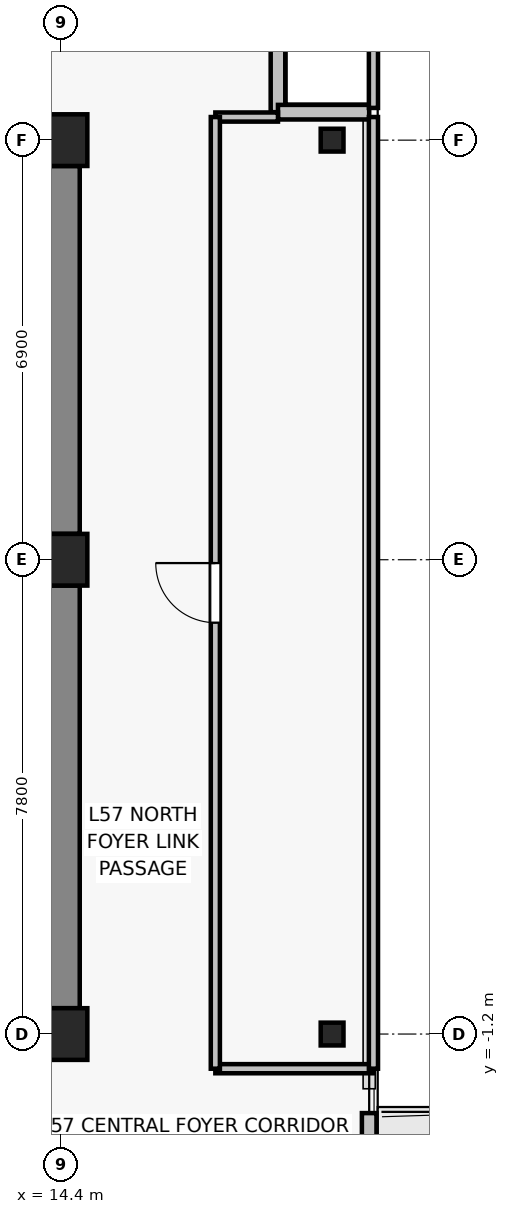
"""IFC4 building model, lengths in metres.
Left out: names, types, materials, properties, quantities, classifications, styles, units other than length and angle.
Written with IfcOpenShell. Run it as: python <this file> out.ifc"""

import sys

from ifc_helpers import new_model, si_unit, direction, frame, frame_2d, origin, origin_2d, place, context, subcontext, project, spatial, rectangle, i_section, extrude, source, transform, mapped, element, fill, save


model = new_model("IFC4")
c1 = context("Model", 3, precision=1e-05, world=origin(), true_north=direction((0.0, 1.0)))
c2 = subcontext(c1, "Body", "Model", "MODEL_VIEW")
j1 = project(units=[si_unit("LENGTHUNIT", "METRE"), si_unit("PLANEANGLEUNIT", "RADIAN")], contexts=[c1])
p1 = place(None, origin())
s1 = spatial("IfcSite", under=j1, at=p1, CompositionType="ELEMENT")
p2 = place(p1, origin())
s2 = spatial("IfcBuilding", under=s1, at=p2, CompositionType="ELEMENT")
p3 = place(p2, frame((0.0, 0.0, 205.6)))
s3 = spatial("IfcBuildingStorey", under=s2, at=p3, CompositionType="ELEMENT", Elevation=205.6)
for number, where, z_axis, x_axis in (
    (1, (14.4, -1.2, 0.0), (0.0, 0.0, 1.0), (1.0, 0.0, 0.0)),
    (2, (14.4, 6.6, 0.0), (0.0, 0.0, 1.0), (1.0, 0.0, 0.0)),
    (3, (14.4, 13.5, 0.0), (0.0, 0.0, 1.0), (1.0, 0.0, 0.0)),
):
    element("IfcColumn", number, at=place(p3, frame(where, z_axis=z_axis, x_axis=x_axis)), inside=s3, PredefinedType="COLUMN", context=c2, shape_type="SweptSolid", body=[
        extrude(rectangle(XDim=0.85, YDim=0.85, at=origin_2d()), origin(), (0.0, 0.0, 1.0), 3.3),
    ])
for number, where, z_axis, x_axis in (
    (4, (18.85, -1.2, 0.0), (0.0, 0.0, 1.0), (1.0, 0.0, 0.0)),
    (5, (18.85, 13.5, 0.0), (0.0, 0.0, 1.0), (1.0, 0.0, 0.0)),
):
    element("IfcColumn", number, at=place(p3, frame(where, z_axis=z_axis, x_axis=x_axis)), inside=s3, PredefinedType="COLUMN", context=c2, shape_type="SweptSolid", body=[
        extrude(i_section(OverallWidth=0.375, OverallDepth=0.375, WebThickness=0.017, FlangeThickness=0.027, FilletRadius=0.015, at=origin_2d()), origin(), (0.0, 0.0, 1.0), 3.3),
    ])
p4 = place(p3, frame((14.4, -0.775, 0.0), z_axis=(0.0, 0.0, 1.0), x_axis=(0.0, 1.0, 0.0)))
e6 = element("IfcWall", 6, at=p4, inside=s3, PredefinedType="SHEAR", context=c2, shape_type="SweptSolid", body=[
    extrude(rectangle(XDim=6.95, YDim=0.6, at=frame_2d((3.475, 0.0))), origin(), (0.0, 0.0, 1.0), 3.075),
])
p5 = place(p3, frame((14.4, 7.025, 0.0), z_axis=(0.0, 0.0, 1.0), x_axis=(0.0, 1.0, 0.0)))
e7 = element("IfcWall", 7, at=p5, inside=s3, PredefinedType="SHEAR", context=c2, shape_type="SweptSolid", body=[
    extrude(rectangle(XDim=6.05, YDim=0.6, at=frame_2d((3.025, 0.0))), origin(), (0.0, 0.0, 1.0), 3.075),
])
p6 = place(p3, frame((19.46, -2.5, 0.0), z_axis=(0.0, 0.0, 1.0), x_axis=(0.0, -1.0, 0.0)))
e8 = element("IfcWall", 8, at=p6, inside=s3, PredefinedType="SOLIDWALL", context=c2, shape_type="SweptSolid", body=[
    extrude(rectangle(XDim=5.8, YDim=0.24, at=frame_2d((2.9, 0.0))), origin(), (0.0, 0.0, 1.0), 3.075),
])
p7 = place(p6, frame((1.566, 0.0, 0.0)))
e9 = element("IfcOpeningElement", 9, at=p7, cuts=e8, PredefinedType="OPENING", context=c2, shape_type="SweptSolid", body=[
    extrude(rectangle(XDim=1.0, YDim=2.2, at=frame_2d((0.5, 1.1))), frame((0.0, 0.13, 0.0), z_axis=(0.0, -1.0, 0.0), x_axis=(1.0, 0.0, 0.0)), (0.0, 0.0, 1.0), 0.26),
])
p8 = place(p6, frame((2.916, 0.0, 0.85)))
e10 = element("IfcOpeningElement", 10, at=p8, cuts=e8, PredefinedType="OPENING", context=c2, shape_type="SweptSolid", body=[
    extrude(rectangle(XDim=1.5, YDim=1.6, at=frame_2d((0.75, 0.8))), frame((0.0, 0.13, 0.0), z_axis=(0.0, -1.0, 0.0), x_axis=(1.0, 0.0, 0.0)), (0.0, 0.0, 1.0), 0.26),
])
for number, where, z_axis, x_axis in (
    (11, (17.96, 13.96, 0.0), (0.0, 0.0, 1.0), (0.0, 1.0, 0.0)),
    (12, (19.46, 13.96, 0.0), (0.0, 0.0, 1.0), (-1.0, 0.0, 0.0)),
):
    element("IfcWall", number, at=place(p3, frame(where, z_axis=z_axis, x_axis=x_axis)), inside=s3, PredefinedType="SOLIDWALL", context=c2, shape_type="SweptSolid", body=[
        extrude(rectangle(XDim=1.5, YDim=0.24, at=frame_2d((0.75, 0.0))), origin(), (0.0, 0.0, 1.0), 3.075),
    ])
p9 = place(p3, frame((19.53, -1.77, 0.0), z_axis=(0.0, 0.0, 1.0), x_axis=(-1.0, 0.0, 0.0)))
e13 = element("IfcWall", 13, at=p9, inside=s3, PredefinedType="PARTITIONING", context=c2, shape_type="SweptSolid", body=[
    extrude(rectangle(XDim=2.6, YDim=0.15, at=frame_2d((1.3, 0.0))), origin(), (0.0, 0.0, 1.0), 2.765),
])
p10 = place(p3, frame((16.93, 13.88, 0.0), z_axis=(0.0, 0.0, 1.0), x_axis=(1.0, 0.0, 0.0)))
e14 = element("IfcWall", 14, at=p10, inside=s3, PredefinedType="PARTITIONING", context=c2, shape_type="SweptSolid", body=[
    extrude(rectangle(XDim=1.03, YDim=0.15, at=frame_2d((0.515, 0.0))), origin(), (0.0, 0.0, 1.0), 3.075),
])
p11 = place(p3, frame((16.93, -1.77, 0.0), z_axis=(0.0, 0.0, 1.0), x_axis=(0.0, 1.0, 0.0)))
e15 = element("IfcWall", 15, at=p11, inside=s3, PredefinedType="PARTITIONING", context=c2, shape_type="SweptSolid", body=[
    extrude(rectangle(XDim=15.65, YDim=0.15, at=frame_2d((7.825, 0.0))), origin(), (0.0, 0.0, 1.0), 2.615),
])
p12 = place(p11, frame((7.335, 0.0, 0.0)))
e16 = element("IfcOpeningElement", 16, at=p12, cuts=e15, PredefinedType="OPENING", context=c2, shape_type="SweptSolid", body=[
    extrude(rectangle(XDim=0.98, YDim=2.15, at=frame_2d((0.49, 1.075))), frame((0.0, 0.085, 0.0), z_axis=(0.0, -1.0, 0.0), x_axis=(1.0, 0.0, 0.0)), (0.0, 0.0, 1.0), 0.17),
])
p13 = place(p3, frame((19.53, 13.88, 0.0), z_axis=(0.0, 0.0, 1.0), x_axis=(0.0, -1.0, 0.0)))
e17 = element("IfcWall", 17, at=p13, inside=s3, PredefinedType="PARTITIONING", context=c2, shape_type="SweptSolid", body=[
    extrude(rectangle(XDim=15.65, YDim=0.15, at=frame_2d((7.825, 0.0))), origin(), (0.0, 0.0, 1.0), 3.075),
])
p14 = place(p3, frame((19.53, 17.03, 0.0), z_axis=(0.0, 0.0, 1.0), x_axis=(0.0, -1.0, 0.0)))
e18 = element("IfcWall", 18, at=p14, inside=s3, PredefinedType="PARTITIONING", context=c2, shape_type="SweptSolid", body=[
    extrude(rectangle(XDim=3.0, YDim=0.15, at=frame_2d((1.5, 0.0))), origin(), (0.0, 0.0, 1.0), 3.075),
])
m1 = source(origin(), c2, "Body", "SweptSolid", [
    extrude(rectangle(XDim=0.98, YDim=2.15, at=frame_2d((0.49, 1.075))), frame((0.0, 0.025, 0.0), z_axis=(0.0, -1.0, 0.0), x_axis=(1.0, 0.0, 0.0)), (0.0, 0.0, 1.0), 0.05),
])
p15 = place(p12, origin())
e19 = element("IfcDoor", 19, at=p15, inside=s3, OperationType="SINGLE_SWING_RIGHT", PredefinedType="DOOR", context=c2, shape_type="MappedRepresentation", body=[
    mapped(m1, transform((0.0, 0.0, 0.0), x_axis=(1.0, 0.0, 0.0), y_axis=(0.0, 1.0, 0.0), z_axis=(0.0, 0.0, 1.0), scale=1.0)),
])
fill(e16, e19)
save(model, sys.argv[1])
